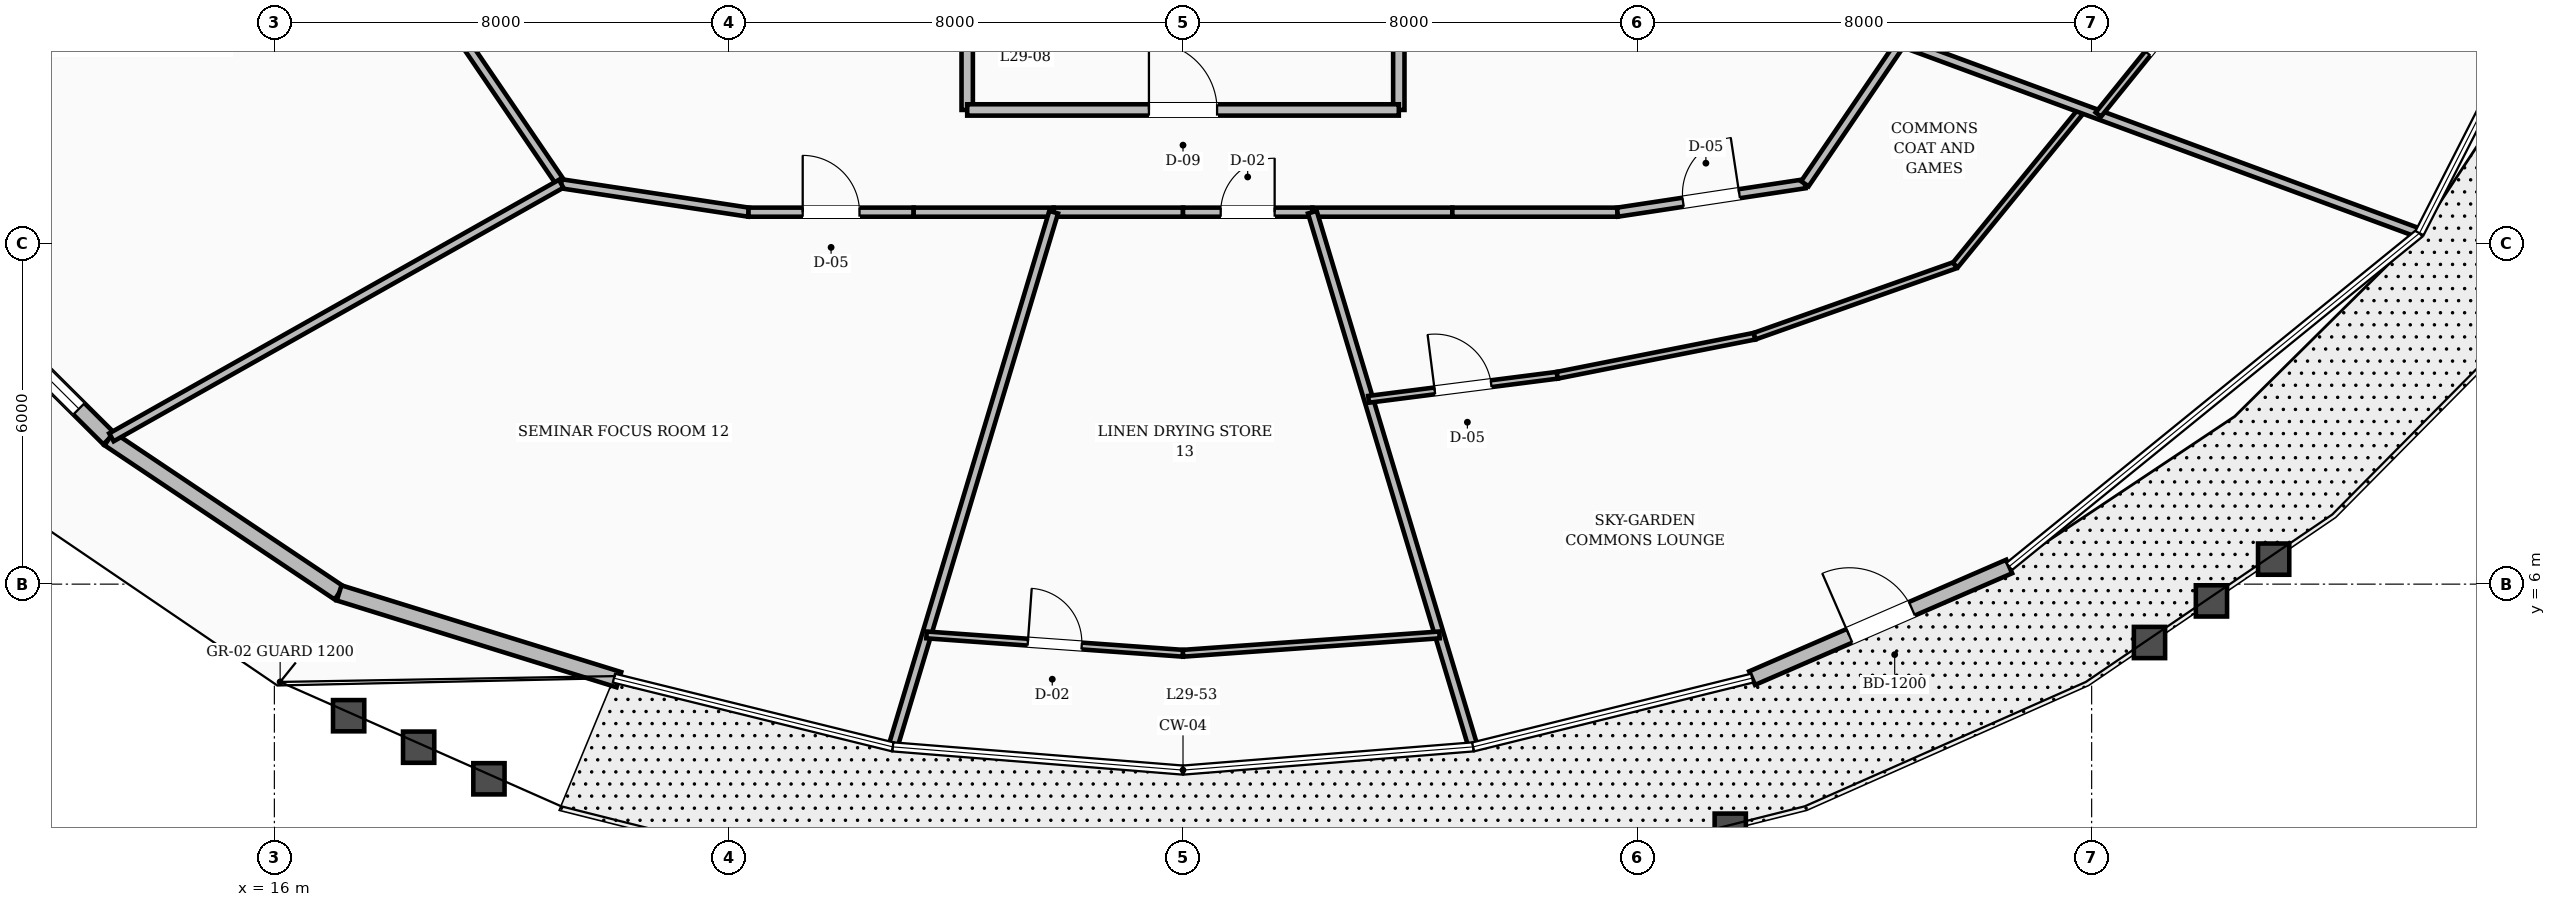
"""IFC4 building model, lengths in metres.
Left out: names, types, materials, properties, quantities, classifications, styles, units other than length and angle.
Written with IfcOpenShell. Run it as: python <this file> out.ifc"""

import sys

from ifc_helpers import new_model, si_unit, direction, frame, frame_2d, origin, place, context, subcontext, project, spatial, rectangle, extrude, element, fill, save


model = new_model("IFC4")
c1 = context("Model", 3, precision=1e-05, world=origin(), true_north=direction((0.0, 1.0)))
c2 = subcontext(c1, "Body", "Model", "MODEL_VIEW")
j1 = project(units=[si_unit("LENGTHUNIT", "METRE"), si_unit("PLANEANGLEUNIT", "RADIAN")], contexts=[c1])
p1 = place(None, origin())
s1 = spatial("IfcSite", under=j1, at=p1, CompositionType="ELEMENT")
p2 = place(p1, origin())
s2 = spatial("IfcBuilding", under=s1, at=p2, CompositionType="ELEMENT")
p3 = place(p2, frame((0.0, 0.0, 117.2)))
s3 = spatial("IfcBuildingStorey", under=s2, at=p3, CompositionType="ELEMENT", Elevation=117.2)
p4 = place(p3, frame((9.761, 11.869, 0.0), z_axis=(0.0, 0.0, 1.0), x_axis=(0.708977561681, -0.705231038052, 0.0)))
e1 = element("IfcWall", 1, at=p4, inside=s3, PredefinedType="STANDARD", context=c2, shape_type="SweptSolid", body=[
    extrude(rectangle(XDim=4.692, YDim=0.28, at=frame_2d((2.346, 0.0))), origin(), (0.0, 0.0, 1.0), 2.82),
])
p5 = place(p4, frame((0.746, 0.0, 0.8)))
e2 = element("IfcOpeningElement", 2, at=p5, cuts=e1, PredefinedType="OPENING", context=c2, shape_type="SweptSolid", body=[
    extrude(rectangle(XDim=3.2, YDim=1.65, at=frame_2d((1.6, 0.825))), frame((0.0, 0.15, 0.0), z_axis=(0.0, -1.0, 0.0), x_axis=(1.0, 0.0, 0.0)), (0.0, 0.0, 1.0), 0.3),
])
p6 = place(p3, frame((13.087, 8.561, 0.0), z_axis=(0.0, 0.0, 1.0), x_axis=(0.830785482437, -0.556592743549, 0.0)))
e3 = element("IfcWall", 3, at=p6, inside=s3, PredefinedType="STANDARD", context=c2, shape_type="SweptSolid", body=[
    extrude(rectangle(XDim=4.878, YDim=0.28, at=frame_2d((2.439, 0.0))), origin(), (0.0, 0.0, 1.0), 2.82),
])
p7 = place(p3, frame((17.14, 5.845, 0.0), z_axis=(0.0, 0.0, 1.0), x_axis=(0.955137109843, -0.296163977218, 0.0)))
e4 = element("IfcWall", 4, at=p7, inside=s3, PredefinedType="STANDARD", context=c2, shape_type="SweptSolid", body=[
    extrude(rectangle(XDim=5.158, YDim=0.28, at=frame_2d((2.579, 0.0))), origin(), (0.0, 0.0, 1.0), 2.82),
])
p8 = place(p3, frame((42.021, 4.345, 0.0), z_axis=(0.0, 0.0, 1.0), x_axis=(0.917243758419, 0.398326358205, 0.0)))
e5 = element("IfcWall", 5, at=p8, inside=s3, PredefinedType="STANDARD", context=c2, shape_type="SweptSolid", body=[
    extrude(rectangle(XDim=4.936, YDim=0.26, at=frame_2d((2.468, 0.0))), origin(), (0.0, 0.0, 1.0), 2.82),
])
p9 = place(p8, frame((1.868, 0.0, 0.0)))
e6 = element("IfcOpeningElement", 6, at=p9, cuts=e5, PredefinedType="OPENING", context=c2, shape_type="SweptSolid", body=[
    extrude(rectangle(XDim=1.2, YDim=2.15, at=frame_2d((0.6, 1.075))), frame((0.0, 0.14, 0.0), z_axis=(0.0, -1.0, 0.0), x_axis=(1.0, 0.0, 0.0)), (0.0, 0.0, 1.0), 0.28),
])
for number, where, z_axis, x_axis in (
    (7, (28.2, 14.35, 0.0), (0.0, 0.0, 1.0), (0.0, 1.0, 0.0)),
    (8, (35.8, 14.35, 0.0), (0.0, 0.0, 1.0), (0.0, 1.0, 0.0)),
):
    element("IfcWall", number, at=place(p3, frame(where, z_axis=z_axis, x_axis=x_axis)), inside=s3, PredefinedType="SOLIDWALL", context=c2, shape_type="SweptSolid", body=[
        extrude(rectangle(XDim=2.2, YDim=0.2, at=frame_2d((1.1, 0.0))), origin(), (0.0, 0.0, 1.0), 2.8),
    ])
p10 = place(p3, frame((28.2, 14.35, 0.0), z_axis=(0.0, 0.0, 1.0), x_axis=(1.0, 0.0, 0.0)))
e9 = element("IfcWall", 9, at=p10, inside=s3, PredefinedType="SOLIDWALL", context=c2, shape_type="SweptSolid", body=[
    extrude(rectangle(XDim=7.6, YDim=0.2, at=frame_2d((3.8, 0.0))), origin(), (0.0, 0.0, 1.0), 2.8),
])
p11 = place(p10, frame((3.2, 0.0, 0.0)))
e10 = element("IfcOpeningElement", 10, at=p11, cuts=e9, PredefinedType="OPENING", context=c2, shape_type="SweptSolid", body=[
    extrude(rectangle(XDim=1.2, YDim=2.1, at=frame_2d((0.6, 1.05))), frame((0.0, 0.11, 0.0), z_axis=(0.0, -1.0, 0.0), x_axis=(1.0, 0.0, 0.0)), (0.0, 0.0, 1.0), 0.22),
])
p12 = place(p3, frame((19.35, 15.548, 0.0), z_axis=(0.0, 0.0, 1.0), x_axis=(0.562674669208, -0.826678423955, 0.0)))
e11 = element("IfcWall", 11, at=p12, inside=s3, PredefinedType="SOLIDWALL", context=c2, shape_type="SweptSolid", body=[
    extrude(rectangle(XDim=3.021, YDim=0.16, at=frame_2d((1.511, 0.0))), origin(), (0.0, 0.0, 1.0), 2.8),
])
p13 = place(p3, frame((21.05, 13.05, 0.0), z_axis=(0.0, 0.0, 1.0), x_axis=(0.988710906508, -0.149835721217, 0.0)))
e12 = element("IfcWall", 12, at=p13, inside=s3, PredefinedType="SOLIDWALL", context=c2, shape_type="SweptSolid", body=[
    extrude(rectangle(XDim=3.337, YDim=0.16, at=frame_2d((1.668, 0.0))), origin(), (0.0, 0.0, 1.0), 2.8),
])
p14 = place(p3, frame((24.349, 12.55, 0.0), z_axis=(0.0, 0.0, 1.0), x_axis=(1.0, 0.0, 0.0)))
e13 = element("IfcWall", 13, at=p14, inside=s3, PredefinedType="SOLIDWALL", context=c2, shape_type="SweptSolid", body=[
    extrude(rectangle(XDim=2.908, YDim=0.16, at=frame_2d((1.454, 0.0))), origin(), (0.0, 0.0, 1.0), 2.8),
])
p15 = place(p14, frame((0.954, 0.0, 0.0)))
e14 = element("IfcOpeningElement", 14, at=p15, cuts=e13, PredefinedType="OPENING", context=c2, shape_type="SweptSolid", body=[
    extrude(rectangle(XDim=1.0, YDim=2.1, at=frame_2d((0.5, 1.05))), frame((0.0, 0.09, 0.0), z_axis=(0.0, -1.0, 0.0), x_axis=(1.0, 0.0, 0.0)), (0.0, 0.0, 1.0), 0.18),
])
p16 = place(p3, frame((27.257, 12.55, 0.0), z_axis=(0.0, 0.0, 1.0), x_axis=(1.0, 0.0, 0.0)))
e15 = element("IfcWall", 15, at=p16, inside=s3, PredefinedType="SOLIDWALL", context=c2, shape_type="SweptSolid", body=[
    extrude(rectangle(XDim=2.465, YDim=0.16, at=frame_2d((1.232, 0.0))), origin(), (0.0, 0.0, 1.0), 2.8),
])
p17 = place(p3, frame((29.722, 12.55, 0.0), z_axis=(0.0, 0.0, 1.0), x_axis=(1.0, 0.0, 0.0)))
e16 = element("IfcWall", 16, at=p17, inside=s3, PredefinedType="SOLIDWALL", context=c2, shape_type="SweptSolid", body=[
    extrude(rectangle(XDim=2.278, YDim=0.16, at=frame_2d((1.139, 0.0))), origin(), (0.0, 0.0, 1.0), 2.8),
])
p18 = place(p3, frame((32.0, 12.55, 0.0), z_axis=(0.0, 0.0, 1.0), x_axis=(1.0, 0.0, 0.0)))
e17 = element("IfcWall", 17, at=p18, inside=s3, PredefinedType="SOLIDWALL", context=c2, shape_type="SweptSolid", body=[
    extrude(rectangle(XDim=2.278, YDim=0.16, at=frame_2d((1.139, 0.0))), origin(), (0.0, 0.0, 1.0), 2.8),
])
p19 = place(p18, frame((0.664, 0.0, 0.0)))
e18 = element("IfcOpeningElement", 18, at=p19, cuts=e17, PredefinedType="OPENING", context=c2, shape_type="SweptSolid", body=[
    extrude(rectangle(XDim=0.95, YDim=2.1, at=frame_2d((0.475, 1.05))), frame((0.0, 0.09, 0.0), z_axis=(0.0, -1.0, 0.0), x_axis=(1.0, 0.0, 0.0)), (0.0, 0.0, 1.0), 0.18),
])
p20 = place(p3, frame((34.278, 12.55, 0.0), z_axis=(0.0, 0.0, 1.0), x_axis=(1.0, 0.0, 0.0)))
e19 = element("IfcWall", 19, at=p20, inside=s3, PredefinedType="SOLIDWALL", context=c2, shape_type="SweptSolid", body=[
    extrude(rectangle(XDim=2.465, YDim=0.16, at=frame_2d((1.232, 0.0))), origin(), (0.0, 0.0, 1.0), 2.8),
])
p21 = place(p3, frame((36.743, 12.55, 0.0), z_axis=(0.0, 0.0, 1.0), x_axis=(1.0, 0.0, 0.0)))
e20 = element("IfcWall", 20, at=p21, inside=s3, PredefinedType="SOLIDWALL", context=c2, shape_type="SweptSolid", body=[
    extrude(rectangle(XDim=2.908, YDim=0.16, at=frame_2d((1.454, 0.0))), origin(), (0.0, 0.0, 1.0), 2.8),
])
p22 = place(p3, frame((39.651, 12.55, 0.0), z_axis=(0.0, 0.0, 1.0), x_axis=(0.988710906508, 0.149835721217, 0.0)))
e21 = element("IfcWall", 21, at=p22, inside=s3, PredefinedType="SOLIDWALL", context=c2, shape_type="SweptSolid", body=[
    extrude(rectangle(XDim=3.337, YDim=0.16, at=frame_2d((1.668, 0.0))), origin(), (0.0, 0.0, 1.0), 2.8),
])
p23 = place(p22, frame((1.168, 0.0, 0.0)))
e22 = element("IfcOpeningElement", 22, at=p23, cuts=e21, PredefinedType="OPENING", context=c2, shape_type="SweptSolid", body=[
    extrude(rectangle(XDim=1.0, YDim=2.1, at=frame_2d((0.5, 1.05))), frame((0.0, 0.09, 0.0), z_axis=(0.0, -1.0, 0.0), x_axis=(1.0, 0.0, 0.0)), (0.0, 0.0, 1.0), 0.18),
])
p24 = place(p3, frame((42.95, 13.05, 0.0), z_axis=(0.0, 0.0, 1.0), x_axis=(0.562674669208, 0.826678423955, 0.0)))
e23 = element("IfcWall", 23, at=p24, inside=s3, PredefinedType="SOLIDWALL", context=c2, shape_type="SweptSolid", body=[
    extrude(rectangle(XDim=3.021, YDim=0.16, at=frame_2d((1.511, 0.0))), origin(), (0.0, 0.0, 1.0), 2.8),
])
p25 = place(p3, frame((34.278, 12.55, 0.0), z_axis=(0.0, 0.0, 1.0), x_axis=(0.287936282095, -0.957649569234, 0.0)))
e24 = element("IfcWall", 24, at=p25, inside=s3, PredefinedType="SOLIDWALL", context=c2, shape_type="SweptSolid", body=[
    extrude(rectangle(XDim=9.782, YDim=0.16, at=frame_2d((4.891, 0.0))), origin(), (0.0, 0.0, 1.0), 2.8),
])
p26 = place(p3, frame((35.268, 9.254, 0.0), z_axis=(0.0, 0.0, 1.0), x_axis=(0.99195835068, 0.12656472856, 0.0)))
e25 = element("IfcWall", 25, at=p26, inside=s3, PredefinedType="PARTITIONING", context=c2, shape_type="SweptSolid", body=[
    extrude(rectangle(XDim=3.349, YDim=0.12, at=frame_2d((1.674, 0.0))), origin(), (0.0, 0.0, 1.0), 2.8),
])
p27 = place(p26, frame((1.174, 0.0, 0.0)))
e26 = element("IfcOpeningElement", 26, at=p27, cuts=e25, PredefinedType="OPENING", context=c2, shape_type="SweptSolid", body=[
    extrude(rectangle(XDim=1.0, YDim=2.1, at=frame_2d((0.5, 1.05))), frame((0.0, 0.07, 0.0), z_axis=(0.0, -1.0, 0.0), x_axis=(1.0, 0.0, 0.0)), (0.0, 0.0, 1.0), 0.14),
])
p28 = place(p3, frame((38.59, 9.678, 0.0), z_axis=(0.0, 0.0, 1.0), x_axis=(0.980955311434, 0.19423356293, 0.0)))
e27 = element("IfcWall", 27, at=p28, inside=s3, PredefinedType="PARTITIONING", context=c2, shape_type="SweptSolid", body=[
    extrude(rectangle(XDim=3.542, YDim=0.12, at=frame_2d((1.771, 0.0))), origin(), (0.0, 0.0, 1.0), 2.8),
])
p29 = place(p3, frame((42.065, 10.366, 0.0), z_axis=(0.0, 0.0, 1.0), x_axis=(0.942672477538, 0.333719343299, 0.0)))
e28 = element("IfcWall", 28, at=p29, inside=s3, PredefinedType="PARTITIONING", context=c2, shape_type="SweptSolid", body=[
    extrude(rectangle(XDim=3.749, YDim=0.12, at=frame_2d((1.874, 0.0))), origin(), (0.0, 0.0, 1.0), 2.8),
])
p30 = place(p3, frame((45.598, 11.617, 0.0), z_axis=(0.0, 0.0, 1.0), x_axis=(0.632136503623, 0.774857045388, 0.0)))
e29 = element("IfcWall", 29, at=p30, inside=s3, PredefinedType="PARTITIONING", context=c2, shape_type="SweptSolid", body=[
    extrude(rectangle(XDim=3.551, YDim=0.12, at=frame_2d((1.776, 0.0))), origin(), (0.0, 0.0, 1.0), 2.8),
])
p31 = place(p3, frame((44.65, 15.548, 0.0), z_axis=(0.0, 0.0, 1.0), x_axis=(0.938144779107, -0.34624322872, 0.0)))
e30 = element("IfcWall", 30, at=p31, inside=s3, PredefinedType="SOLIDWALL", context=c2, shape_type="SweptSolid", body=[
    extrude(rectangle(XDim=9.675, YDim=0.16, at=frame_2d((4.837, 0.0))), origin(), (0.0, 0.0, 1.0), 2.8),
])
p32 = place(p3, frame((48.117, 14.268, 0.0), z_axis=(0.0, 0.0, 1.0), x_axis=(0.628695338922, 0.777651702768, 0.0)))
e31 = element("IfcWall", 31, at=p32, inside=s3, PredefinedType="PARTITIONING", context=c2, shape_type="SweptSolid", body=[
    extrude(rectangle(XDim=3.632, YDim=0.12, at=frame_2d((1.816, 0.0))), origin(), (0.0, 0.0, 1.0), 2.8),
])
p33 = place(p32, frame((1.386, 0.0, 0.0)))
e32 = element("IfcOpeningElement", 32, at=p33, cuts=e31, PredefinedType="OPENING", context=c2, shape_type="SweptSolid", body=[
    extrude(rectangle(XDim=0.86, YDim=2.1, at=frame_2d((0.43, 1.05))), frame((0.0, 0.07, 0.0), z_axis=(0.0, -1.0, 0.0), x_axis=(1.0, 0.0, 0.0)), (0.0, 0.0, 1.0), 0.14),
])
p34 = place(p3, frame((21.05, 13.05, 0.0), z_axis=(0.0, 0.0, 1.0), x_axis=(-0.871084529958, -0.491133120109, 0.0)))
e33 = element("IfcWall", 33, at=p34, inside=s3, PredefinedType="SOLIDWALL", context=c2, shape_type="SweptSolid", body=[
    extrude(rectangle(XDim=9.091, YDim=0.16, at=frame_2d((4.545, 0.0))), origin(), (0.0, 0.0, 1.0), 2.8),
])
p35 = place(p3, frame((29.722, 12.55, 0.0), z_axis=(0.0, 0.0, 1.0), x_axis=(-0.287936282095, -0.957649569234, 0.0)))
e34 = element("IfcWall", 34, at=p35, inside=s3, PredefinedType="SOLIDWALL", context=c2, shape_type="SweptSolid", body=[
    extrude(rectangle(XDim=9.782, YDim=0.16, at=frame_2d((4.891, 0.0))), origin(), (0.0, 0.0, 1.0), 2.8),
])
p36 = place(p3, frame((27.484, 5.106, 0.0), z_axis=(0.0, 0.0, 1.0), x_axis=(0.997451851948, -0.071342855605, 0.0)))
e35 = element("IfcWall", 35, at=p36, inside=s3, PredefinedType="PARTITIONING", context=c2, shape_type="SweptSolid", body=[
    extrude(rectangle(XDim=4.527, YDim=0.12, at=frame_2d((2.264, 0.0))), origin(), (0.0, 0.0, 1.0), 2.8),
])
p37 = place(p36, frame((1.789, 0.0, 0.0)))
e36 = element("IfcOpeningElement", 36, at=p37, cuts=e35, PredefinedType="OPENING", context=c2, shape_type="SweptSolid", body=[
    extrude(rectangle(XDim=0.95, YDim=2.1, at=frame_2d((0.475, 1.05))), frame((0.0, 0.07, 0.0), z_axis=(0.0, -1.0, 0.0), x_axis=(1.0, 0.0, 0.0)), (0.0, 0.0, 1.0), 0.14),
])
p38 = place(p3, frame((32.0, 4.783, 0.0), z_axis=(0.0, 0.0, 1.0), x_axis=(0.997451851948, 0.071342855605, 0.0)))
e37 = element("IfcWall", 37, at=p38, inside=s3, PredefinedType="PARTITIONING", context=c2, shape_type="SweptSolid", body=[
    extrude(rectangle(XDim=4.527, YDim=0.12, at=frame_2d((2.264, 0.0))), origin(), (0.0, 0.0, 1.0), 2.8),
])
p39 = place(p5, origin())
e38 = element("IfcWindow", 38, at=p39, inside=s3, PartitioningType="SINGLE_PANEL", PredefinedType="WINDOW", context=c2, shape_type="SweptSolid", body=[
    extrude(rectangle(XDim=3.2, YDim=1.65, at=frame_2d((1.6, 0.825))), frame((0.0, 0.03, 0.0), z_axis=(0.0, -1.0, 0.0), x_axis=(1.0, 0.0, 0.0)), (0.0, 0.0, 1.0), 0.06),
])
fill(e2, e38)
p40 = place(p9, origin())
e39 = element("IfcDoor", 39, at=p40, inside=s3, OperationType="SINGLE_SWING_LEFT", PredefinedType="DOOR", context=c2, shape_type="SweptSolid", body=[
    extrude(rectangle(XDim=1.2, YDim=2.15, at=frame_2d((0.6, 1.075))), frame((0.0, 0.025, 0.0), z_axis=(0.0, -1.0, 0.0), x_axis=(1.0, 0.0, 0.0)), (0.0, 0.0, 1.0), 0.05),
])
fill(e6, e39)
p41 = place(p11, origin())
e40 = element("IfcDoor", 40, at=p41, inside=s3, OperationType="SINGLE_SWING_LEFT", PredefinedType="DOOR", context=c2, shape_type="SweptSolid", body=[
    extrude(rectangle(XDim=1.2, YDim=2.1, at=frame_2d((0.6, 1.05))), frame((0.0, 0.025, 0.0), z_axis=(0.0, -1.0, 0.0), x_axis=(1.0, 0.0, 0.0)), (0.0, 0.0, 1.0), 0.05),
])
fill(e10, e40)
p42 = place(p23, origin())
e41 = element("IfcDoor", 41, at=p42, inside=s3, OperationType="SINGLE_SWING_RIGHT", PredefinedType="DOOR", context=c2, shape_type="SweptSolid", body=[
    extrude(rectangle(XDim=1.0, YDim=2.1, at=frame_2d((0.5, 1.05))), frame((0.0, 0.025, 0.0), z_axis=(0.0, -1.0, 0.0), x_axis=(1.0, 0.0, 0.0)), (0.0, 0.0, 1.0), 0.05),
])
fill(e22, e41)
p43 = place(p27, origin())
e42 = element("IfcDoor", 42, at=p43, inside=s3, OperationType="SINGLE_SWING_LEFT", PredefinedType="DOOR", context=c2, shape_type="SweptSolid", body=[
    extrude(rectangle(XDim=1.0, YDim=2.1, at=frame_2d((0.5, 1.05))), frame((0.0, 0.025, 0.0), z_axis=(0.0, -1.0, 0.0), x_axis=(1.0, 0.0, 0.0)), (0.0, 0.0, 1.0), 0.05),
])
fill(e26, e42)
p44 = place(p33, origin())
e43 = element("IfcDoor", 43, at=p44, inside=s3, OperationType="SINGLE_SWING_RIGHT", PredefinedType="DOOR", context=c2, shape_type="SweptSolid", body=[
    extrude(rectangle(XDim=0.86, YDim=2.1, at=frame_2d((0.43, 1.05))), frame((0.0, 0.025, 0.0), z_axis=(0.0, -1.0, 0.0), x_axis=(1.0, 0.0, 0.0)), (0.0, 0.0, 1.0), 0.05),
])
fill(e32, e43)
p45 = place(p15, origin())
e44 = element("IfcDoor", 44, at=p45, inside=s3, OperationType="SINGLE_SWING_LEFT", PredefinedType="DOOR", context=c2, shape_type="SweptSolid", body=[
    extrude(rectangle(XDim=1.0, YDim=2.1, at=frame_2d((0.5, 1.05))), frame((0.0, 0.025, 0.0), z_axis=(0.0, -1.0, 0.0), x_axis=(1.0, 0.0, 0.0)), (0.0, 0.0, 1.0), 0.05),
])
fill(e14, e44)
p46 = place(p19, origin())
e45 = element("IfcDoor", 45, at=p46, inside=s3, OperationType="SINGLE_SWING_RIGHT", PredefinedType="DOOR", context=c2, shape_type="SweptSolid", body=[
    extrude(rectangle(XDim=0.95, YDim=2.1, at=frame_2d((0.475, 1.05))), frame((0.0, 0.025, 0.0), z_axis=(0.0, -1.0, 0.0), x_axis=(1.0, 0.0, 0.0)), (0.0, 0.0, 1.0), 0.05),
])
fill(e18, e45)
p47 = place(p37, origin())
e46 = element("IfcDoor", 46, at=p47, inside=s3, OperationType="SINGLE_SWING_LEFT", PredefinedType="DOOR", context=c2, shape_type="SweptSolid", body=[
    extrude(rectangle(XDim=0.95, YDim=2.1, at=frame_2d((0.475, 1.05))), frame((0.0, 0.025, 0.0), z_axis=(0.0, -1.0, 0.0), x_axis=(1.0, 0.0, 0.0)), (0.0, 0.0, 1.0), 0.05),
])
fill(e36, e46)
save(model, sys.argv[1])
